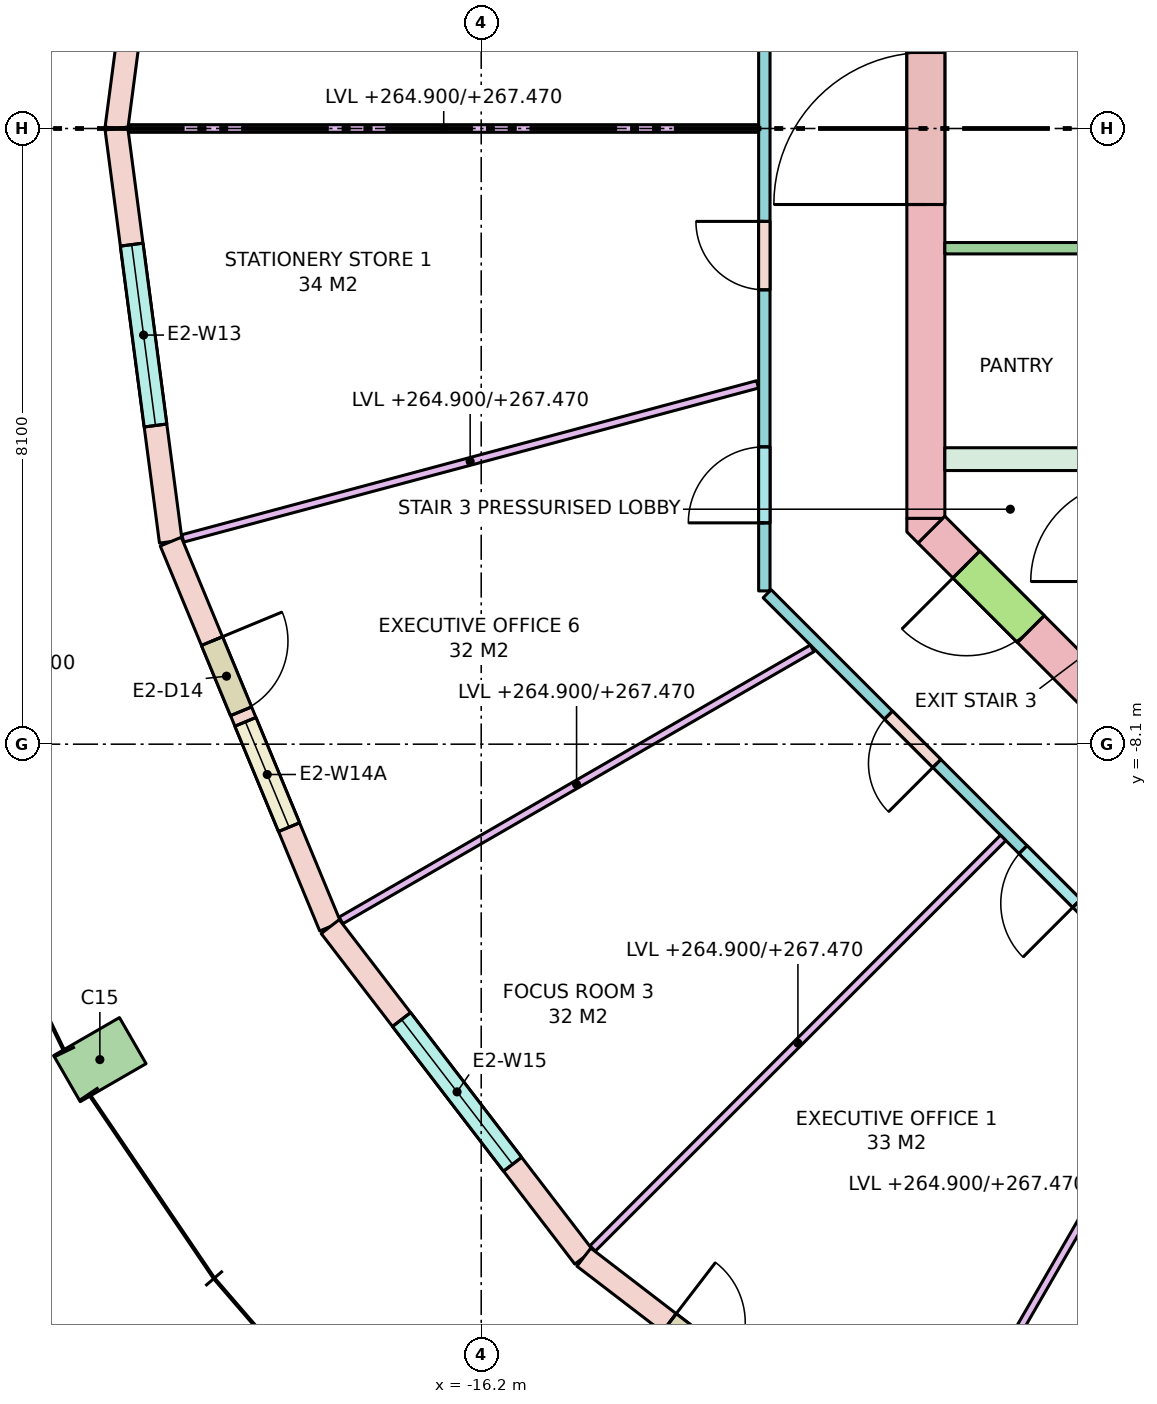
"""IFC4 building model, lengths in metres.
Left out: names, types, materials, properties, quantities, classifications, styles, units other than length and angle.
Written with IfcOpenShell. Run it as: python <this file> out.ifc"""

import sys

from ifc_helpers import new_model, si_unit, direction, frame, frame_2d, origin, origin_2d, place, context, subcontext, project, spatial, polyline, rectangle, outline, extrude, element, fill, save


model = new_model("IFC4")
c1 = context("Model", 3, precision=1e-05, world=origin(), true_north=direction((0.0, 1.0)))
c2 = subcontext(c1, "Body", "Model", "MODEL_VIEW")
j1 = project(units=[si_unit("LENGTHUNIT", "METRE"), si_unit("PLANEANGLEUNIT", "RADIAN")], contexts=[c1])
p1 = place(None, origin())
s1 = spatial("IfcSite", under=j1, at=p1, CompositionType="ELEMENT")
p2 = place(p1, origin())
s2 = spatial("IfcBuilding", under=s1, at=p2, CompositionType="ELEMENT")
p3 = place(p2, frame((0.0, 0.0, 264.9)))
s3 = spatial("IfcBuildingStorey", under=s2, at=p3, CompositionType="ELEMENT", Elevation=264.9)
p4 = place(p3, frame((-21.218, -12.25, 0.0), z_axis=(0.0, 0.0, 1.0), x_axis=(0.5, -0.866025403784, 0.0)))
e1 = element("IfcColumn", 1, at=p4, inside=s3, PredefinedType="COLUMN", context=c2, shape_type="SweptSolid", body=[
    extrude(rectangle(XDim=0.7, YDim=1.0, at=origin_2d()), origin(), (0.0, 0.0, 1.0), 3.7),
])
p5 = place(p3, frame((-10.35, -5.13, -0.28), z_axis=(0.0, 0.0, 1.0), x_axis=(0.0, 1.0, 0.0)))
e2 = element("IfcWall", 2, at=p5, inside=s3, PredefinedType="SHEAR", context=c2, shape_type="SweptSolid", body=[
    extrude(rectangle(XDim=10.26, YDim=0.5, at=frame_2d((5.13, 0.0))), origin(), (0.0, 0.0, 1.0), 3.7),
])
p6 = place(p5, frame((4.13, 0.0, 0.28)))
e3 = element("IfcOpeningElement", 3, at=p6, cuts=e2, PredefinedType="OPENING", context=c2, shape_type="SweptSolid", body=[
    extrude(rectangle(XDim=2.0, YDim=2.1, at=frame_2d((1.0, 1.05))), frame((0.0, 0.26, 0.0), z_axis=(0.0, -1.0, 0.0), x_axis=(1.0, 0.0, 0.0)), (0.0, 0.0, 1.0), 0.52),
])
p7 = place(p3, frame((-7.277, -8.277, -0.28), z_axis=(0.0, 0.0, 1.0), x_axis=(-0.707106781187, 0.707106781187, 0.0)))
e4 = element("IfcWall", 4, at=p7, inside=s3, PredefinedType="SHEAR", context=c2, shape_type="SweptSolid", body=[
    extrude(rectangle(XDim=4.243, YDim=0.5, at=frame_2d((2.121, 0.0))), origin(), (0.0, 0.0, 1.0), 3.7),
])
p8 = place(p7, frame((2.393, 0.0, 0.28)))
e5 = element("IfcOpeningElement", 5, at=p8, cuts=e4, PredefinedType="OPENING", context=c2, shape_type="SweptSolid", body=[
    extrude(rectangle(XDim=1.2, YDim=2.1, at=frame_2d((0.6, 1.05))), frame((0.0, 0.26, 0.0), z_axis=(0.0, -1.0, 0.0), x_axis=(1.0, 0.0, 0.0)), (0.0, 0.0, 1.0), 0.52),
])
p9 = place(p3, frame((0.0, 0.0, -0.28)))
e6 = element("IfcWall", 6, at=p9, inside=s3, PredefinedType="SHEAR", context=c2, shape_type="SweptSolid", body=[
    extrude(outline(polyline([(-10.6, -5.307), (-10.6, -5.13), (-10.13, -5.13), (-10.454, -5.454), (-10.6, -5.307)])), origin(), (0.0, 0.0, 1.0), 3.7),
])
p10 = place(p3, frame((-10.1, -4.35, 0.0), z_axis=(0.0, 0.0, 1.0), x_axis=(1.0, 0.0, 0.0)))
e7 = element("IfcWall", 7, at=p10, inside=s3, PredefinedType="SOLIDWALL", context=c2, shape_type="SweptSolid", body=[
    extrude(rectangle(XDim=8.1, YDim=0.3, at=frame_2d((4.05, 0.0))), origin(), (0.0, 0.0, 1.0), 3.42),
])
p11 = place(p3, frame((-20.284, 5.435, 0.0), z_axis=(0.0, 0.0, 1.0), x_axis=(-0.130527087244, -0.991444743541, 0.0)))
e8 = element("IfcWall", 8, at=p11, inside=s3, PredefinedType="STANDARD", context=c2, shape_type="SweptSolid", body=[
    extrude(rectangle(XDim=5.482, YDim=0.3, at=frame_2d((2.741, 0.0))), origin(), (0.0, 0.0, 1.0), 3.42),
])
p12 = place(p11, frame((1.416, 0.0, 0.0)))
e9 = element("IfcOpeningElement", 9, at=p12, cuts=e8, PredefinedType="OPENING", context=c2, shape_type="SweptSolid", body=[
    extrude(rectangle(XDim=1.0, YDim=2.4, at=frame_2d((0.5, 1.2))), frame((0.0, 0.16, 0.0), z_axis=(0.0, -1.0, 0.0), x_axis=(1.0, 0.0, 0.0)), (0.0, 0.0, 1.0), 0.32),
])
p13 = place(p11, frame((2.566, 0.0, 0.8)))
e10 = element("IfcOpeningElement", 10, at=p13, cuts=e8, PredefinedType="OPENING", context=c2, shape_type="SweptSolid", body=[
    extrude(rectangle(XDim=1.5, YDim=2.4, at=frame_2d((0.75, 1.2))), frame((0.0, 0.16, 0.0), z_axis=(0.0, -1.0, 0.0), x_axis=(1.0, 0.0, 0.0)), (0.0, 0.0, 1.0), 0.32),
])
p14 = place(p3, frame((-21.0, 0.0, 0.0), z_axis=(0.0, 0.0, 1.0), x_axis=(0.130527087244, -0.991444743541, 0.0)))
e11 = element("IfcWall", 11, at=p14, inside=s3, PredefinedType="STANDARD", context=c2, shape_type="SweptSolid", body=[
    extrude(rectangle(XDim=5.482, YDim=0.3, at=frame_2d((2.741, 0.0))), origin(), (0.0, 0.0, 1.0), 3.42),
])
p15 = place(p14, frame((1.541, 0.0, 0.8)))
e12 = element("IfcOpeningElement", 12, at=p15, cuts=e11, PredefinedType="OPENING", context=c2, shape_type="SweptSolid", body=[
    extrude(rectangle(XDim=2.4, YDim=2.4, at=frame_2d((1.2, 1.2))), frame((0.0, 0.16, 0.0), z_axis=(0.0, -1.0, 0.0), x_axis=(1.0, 0.0, 0.0)), (0.0, 0.0, 1.0), 0.32),
])
p16 = place(p3, frame((-20.284, -5.435, 0.0), z_axis=(0.0, 0.0, 1.0), x_axis=(0.382688740813, -0.923877333662, 0.0)))
e13 = element("IfcWall", 13, at=p16, inside=s3, PredefinedType="STANDARD", context=c2, shape_type="SweptSolid", body=[
    extrude(rectangle(XDim=5.482, YDim=0.3, at=frame_2d((2.741, 0.0))), origin(), (0.0, 0.0, 1.0), 3.42),
])
p17 = place(p16, frame((1.416, 0.0, 0.0)))
e14 = element("IfcOpeningElement", 14, at=p17, cuts=e13, PredefinedType="OPENING", context=c2, shape_type="SweptSolid", body=[
    extrude(rectangle(XDim=1.0, YDim=2.4, at=frame_2d((0.5, 1.2))), frame((0.0, 0.16, 0.0), z_axis=(0.0, -1.0, 0.0), x_axis=(1.0, 0.0, 0.0)), (0.0, 0.0, 1.0), 0.32),
])
p18 = place(p16, frame((2.566, 0.0, 0.8)))
e15 = element("IfcOpeningElement", 15, at=p18, cuts=e13, PredefinedType="OPENING", context=c2, shape_type="SweptSolid", body=[
    extrude(rectangle(XDim=1.5, YDim=2.4, at=frame_2d((0.75, 1.2))), frame((0.0, 0.16, 0.0), z_axis=(0.0, -1.0, 0.0), x_axis=(1.0, 0.0, 0.0)), (0.0, 0.0, 1.0), 0.32),
])
p19 = place(p3, frame((-18.187, -10.5, 0.0), z_axis=(0.0, 0.0, 1.0), x_axis=(0.608784891166, -0.793335336593, 0.0)))
e16 = element("IfcWall", 16, at=p19, inside=s3, PredefinedType="STANDARD", context=c2, shape_type="SweptSolid", body=[
    extrude(rectangle(XDim=5.482, YDim=0.3, at=frame_2d((2.741, 0.0))), origin(), (0.0, 0.0, 1.0), 3.42),
])
p20 = place(p19, frame((1.541, 0.0, 0.8)))
e17 = element("IfcOpeningElement", 17, at=p20, cuts=e16, PredefinedType="OPENING", context=c2, shape_type="SweptSolid", body=[
    extrude(rectangle(XDim=2.4, YDim=2.4, at=frame_2d((1.2, 1.2))), frame((0.0, 0.16, 0.0), z_axis=(0.0, -1.0, 0.0), x_axis=(1.0, 0.0, 0.0)), (0.0, 0.0, 1.0), 0.32),
])
p21 = place(p3, frame((-14.849, -14.849, 0.0), z_axis=(0.0, 0.0, 1.0), x_axis=(0.793335336593, -0.608784891166, 0.0)))
e18 = element("IfcWall", 18, at=p21, inside=s3, PredefinedType="STANDARD", context=c2, shape_type="SweptSolid", body=[
    extrude(rectangle(XDim=5.482, YDim=0.3, at=frame_2d((2.741, 0.0))), origin(), (0.0, 0.0, 1.0), 3.42),
])
p22 = place(p21, frame((1.416, 0.0, 0.0)))
e19 = element("IfcOpeningElement", 19, at=p22, cuts=e18, PredefinedType="OPENING", context=c2, shape_type="SweptSolid", body=[
    extrude(rectangle(XDim=1.0, YDim=2.4, at=frame_2d((0.5, 1.2))), frame((0.0, 0.16, 0.0), z_axis=(0.0, -1.0, 0.0), x_axis=(1.0, 0.0, 0.0)), (0.0, 0.0, 1.0), 0.32),
])
p23 = place(p21, frame((2.566, 0.0, 0.8)))
e20 = element("IfcOpeningElement", 20, at=p23, cuts=e18, PredefinedType="OPENING", context=c2, shape_type="SweptSolid", body=[
    extrude(rectangle(XDim=1.5, YDim=2.4, at=frame_2d((0.75, 1.2))), frame((0.0, 0.16, 0.0), z_axis=(0.0, -1.0, 0.0), x_axis=(1.0, 0.0, 0.0)), (0.0, 0.0, 1.0), 0.32),
])
p24 = place(p3, frame((-10.1, -1.575, 0.0), z_axis=(0.0, 0.0, 1.0), x_axis=(1.0, 0.0, 0.0)))
e21 = element("IfcWall", 21, at=p24, inside=s3, PredefinedType="PARTITIONING", context=c2, shape_type="SweptSolid", body=[
    extrude(rectangle(XDim=8.1, YDim=0.15, at=frame_2d((4.05, 0.0))), origin(), (0.0, 0.0, 1.0), 3.42),
])
p25 = place(p24, frame((2.333, 0.0, 0.0)))
e22 = element("IfcOpeningElement", 22, at=p25, cuts=e21, PredefinedType="OPENING", context=c2, shape_type="SweptSolid", body=[
    extrude(rectangle(XDim=0.9, YDim=2.1, at=frame_2d((0.45, 1.05))), frame((0.0, 0.085, 0.0), z_axis=(0.0, -1.0, 0.0), x_axis=(1.0, 0.0, 0.0)), (0.0, 0.0, 1.0), 0.17),
])
p26 = place(p24, frame((6.35, 0.0, 0.0)))
e23 = element("IfcOpeningElement", 23, at=p26, cuts=e21, PredefinedType="OPENING", context=c2, shape_type="SweptSolid", body=[
    extrude(rectangle(XDim=0.9, YDim=2.1, at=frame_2d((0.45, 1.05))), frame((0.0, 0.085, 0.0), z_axis=(0.0, -1.0, 0.0), x_axis=(1.0, 0.0, 0.0)), (0.0, 0.0, 1.0), 0.17),
])
p27 = place(p3, frame((-8.121, -10.438, 0.0), z_axis=(0.0, 0.0, 1.0), x_axis=(-0.707106781187, 0.707106781187, 0.0)))
e24 = element("IfcWall", 24, at=p27, inside=s3, PredefinedType="PARTITIONING", context=c2, shape_type="SweptSolid", body=[
    extrude(rectangle(XDim=6.105, YDim=0.15, at=frame_2d((3.053, 0.0))), origin(), (0.0, 0.0, 1.0), 2.57),
])
p28 = place(p27, frame((0.344, 0.0, 0.0)))
e25 = element("IfcOpeningElement", 25, at=p28, cuts=e24, PredefinedType="OPENING", context=c2, shape_type="SweptSolid", body=[
    extrude(rectangle(XDim=1.0, YDim=2.1, at=frame_2d((0.5, 1.05))), frame((0.0, 0.085, 0.0), z_axis=(0.0, -1.0, 0.0), x_axis=(1.0, 0.0, 0.0)), (0.0, 0.0, 1.0), 0.17),
])
p29 = place(p27, frame((2.948, 0.0, 0.0)))
e26 = element("IfcOpeningElement", 26, at=p29, cuts=e24, PredefinedType="OPENING", context=c2, shape_type="SweptSolid", body=[
    extrude(rectangle(XDim=0.9, YDim=2.1, at=frame_2d((0.45, 1.05))), frame((0.0, 0.085, 0.0), z_axis=(0.0, -1.0, 0.0), x_axis=(1.0, 0.0, 0.0)), (0.0, 0.0, 1.0), 0.17),
])
p30 = place(p3, frame((-12.475, -6.084, 0.0), z_axis=(0.0, 0.0, 1.0), x_axis=(0.0, 1.0, 0.0)))
e27 = element("IfcWall", 27, at=p30, inside=s3, PredefinedType="PARTITIONING", context=c2, shape_type="SweptSolid", body=[
    extrude(rectangle(XDim=12.167, YDim=0.15, at=frame_2d((6.084, 0.0))), origin(), (0.0, 0.0, 1.0), 2.57),
])
p31 = place(p30, frame((10.272, 0.0, 0.0)))
e28 = element("IfcOpeningElement", 28, at=p31, cuts=e27, PredefinedType="OPENING", context=c2, shape_type="SweptSolid", body=[
    extrude(rectangle(XDim=1.0, YDim=2.1, at=frame_2d((0.5, 1.05))), frame((0.0, 0.085, 0.0), z_axis=(0.0, -1.0, 0.0), x_axis=(1.0, 0.0, 0.0)), (0.0, 0.0, 1.0), 0.17),
])
p32 = place(p30, frame((7.306, 0.0, 0.0)))
e29 = element("IfcOpeningElement", 29, at=p32, cuts=e27, PredefinedType="OPENING", context=c2, shape_type="SweptSolid", body=[
    extrude(rectangle(XDim=0.9, YDim=2.1, at=frame_2d((0.45, 1.05))), frame((0.0, 0.085, 0.0), z_axis=(0.0, -1.0, 0.0), x_axis=(1.0, 0.0, 0.0)), (0.0, 0.0, 1.0), 0.17),
])
p33 = place(p30, frame((3.961, 0.0, 0.0)))
e30 = element("IfcOpeningElement", 30, at=p33, cuts=e27, PredefinedType="OPENING", context=c2, shape_type="SweptSolid", body=[
    extrude(rectangle(XDim=0.9, YDim=2.1, at=frame_2d((0.45, 1.05))), frame((0.0, 0.085, 0.0), z_axis=(0.0, -1.0, 0.0), x_axis=(1.0, 0.0, 0.0)), (0.0, 0.0, 1.0), 0.17),
])
p34 = place(p30, frame((0.896, 0.0, 0.0)))
e31 = element("IfcOpeningElement", 31, at=p34, cuts=e27, PredefinedType="OPENING", context=c2, shape_type="SweptSolid", body=[
    extrude(rectangle(XDim=1.0, YDim=2.1, at=frame_2d((0.5, 1.05))), frame((0.0, 0.085, 0.0), z_axis=(0.0, -1.0, 0.0), x_axis=(1.0, 0.0, 0.0)), (0.0, 0.0, 1.0), 0.17),
])
p35 = place(p3, frame((-12.55, 0.0, 0.0), z_axis=(0.0, 0.0, 1.0), x_axis=(-1.0, 0.0, 0.0)))
e32 = element("IfcWall", 32, at=p35, inside=s3, PredefinedType="PARTITIONING", context=c2, shape_type="SweptSolid", body=[
    extrude(rectangle(XDim=8.287, YDim=0.1, at=frame_2d((4.143, 0.0))), origin(), (0.0, 0.0, 1.0), 2.57),
])
p36 = place(p3, frame((-12.564, -3.367, 0.0), z_axis=(0.0, 0.0, 1.0), x_axis=(-0.965933576344, -0.258790119773, 0.0)))
e33 = element("IfcWall", 33, at=p36, inside=s3, PredefinedType="PARTITIONING", context=c2, shape_type="SweptSolid", body=[
    extrude(rectangle(XDim=7.829, YDim=0.1, at=frame_2d((3.915, 0.0))), origin(), (0.0, 0.0, 1.0), 2.57),
])
p37 = place(p3, frame((-11.846, -6.839, 0.0), z_axis=(0.0, 0.0, 1.0), x_axis=(-0.866011787705, -0.500023583, 0.0)))
e34 = element("IfcWall", 34, at=p37, inside=s3, PredefinedType="PARTITIONING", context=c2, shape_type="SweptSolid", body=[
    extrude(rectangle(XDim=7.158, YDim=0.1, at=frame_2d((3.579, 0.0))), origin(), (0.0, 0.0, 1.0), 2.57),
])
p38 = place(p3, frame((-9.333, -9.333, 0.0), z_axis=(0.0, 0.0, 1.0), x_axis=(-0.707106781187, -0.707106781187, 0.0)))
e35 = element("IfcWall", 35, at=p38, inside=s3, PredefinedType="PARTITIONING", context=c2, shape_type="SweptSolid", body=[
    extrude(rectangle(XDim=7.639, YDim=0.1, at=frame_2d((3.819, 0.0))), origin(), (0.0, 0.0, 1.0), 2.57),
])
p39 = place(p3, frame((-6.105, -10.575, 0.0), z_axis=(0.0, 0.0, 1.0), x_axis=(-0.50001399067, -0.866017326117, 0.0)))
e36 = element("IfcWall", 36, at=p39, inside=s3, PredefinedType="PARTITIONING", context=c2, shape_type="SweptSolid", body=[
    extrude(rectangle(XDim=8.626, YDim=0.1, at=frame_2d((4.313, 0.0))), origin(), (0.0, 0.0, 1.0), 2.57),
])
p40 = place(p15, origin())
e37 = element("IfcWindow", 37, at=p40, inside=s3, PartitioningType="SINGLE_PANEL", PredefinedType="WINDOW", context=c2, shape_type="SweptSolid", body=[
    extrude(rectangle(XDim=2.4, YDim=2.4, at=frame_2d((1.2, 1.2))), frame((0.0, 0.03, 0.0), z_axis=(0.0, -1.0, 0.0), x_axis=(1.0, 0.0, 0.0)), (0.0, 0.0, 1.0), 0.06),
])
fill(e12, e37)
p41 = place(p17, origin())
e38 = element("IfcDoor", 38, at=p41, inside=s3, OperationType="SINGLE_SWING_LEFT", PredefinedType="DOOR", context=c2, shape_type="SweptSolid", body=[
    extrude(rectangle(XDim=1.0, YDim=2.4, at=frame_2d((0.5, 1.2))), frame((0.0, 0.025, 0.0), z_axis=(0.0, -1.0, 0.0), x_axis=(1.0, 0.0, 0.0)), (0.0, 0.0, 1.0), 0.05),
])
fill(e14, e38)
p42 = place(p18, origin())
e39 = element("IfcWindow", 39, at=p42, inside=s3, PartitioningType="SINGLE_PANEL", PredefinedType="WINDOW", context=c2, shape_type="SweptSolid", body=[
    extrude(rectangle(XDim=1.5, YDim=2.4, at=frame_2d((0.75, 1.2))), frame((0.0, 0.03, 0.0), z_axis=(0.0, -1.0, 0.0), x_axis=(1.0, 0.0, 0.0)), (0.0, 0.0, 1.0), 0.06),
])
fill(e15, e39)
p43 = place(p20, origin())
e40 = element("IfcWindow", 40, at=p43, inside=s3, PartitioningType="SINGLE_PANEL", PredefinedType="WINDOW", context=c2, shape_type="SweptSolid", body=[
    extrude(rectangle(XDim=2.4, YDim=2.4, at=frame_2d((1.2, 1.2))), frame((0.0, 0.03, 0.0), z_axis=(0.0, -1.0, 0.0), x_axis=(1.0, 0.0, 0.0)), (0.0, 0.0, 1.0), 0.06),
])
fill(e17, e40)
p44 = place(p22, origin())
e41 = element("IfcDoor", 41, at=p44, inside=s3, OperationType="SINGLE_SWING_LEFT", PredefinedType="DOOR", context=c2, shape_type="SweptSolid", body=[
    extrude(rectangle(XDim=1.0, YDim=2.4, at=frame_2d((0.5, 1.2))), frame((0.0, 0.025, 0.0), z_axis=(0.0, -1.0, 0.0), x_axis=(1.0, 0.0, 0.0)), (0.0, 0.0, 1.0), 0.05),
])
fill(e19, e41)
p45 = place(p8, origin())
e42 = element("IfcDoor", 42, at=p45, inside=s3, OperationType="SINGLE_SWING_RIGHT", PredefinedType="DOOR", context=c2, shape_type="SweptSolid", body=[
    extrude(rectangle(XDim=1.2, YDim=2.1, at=frame_2d((0.6, 1.05))), frame((0.0, 0.025, 0.0), z_axis=(0.0, -1.0, 0.0), x_axis=(1.0, 0.0, 0.0)), (0.0, 0.0, 1.0), 0.05),
])
fill(e5, e42)
p46 = place(p6, origin())
e43 = element("IfcDoor", 43, at=p46, inside=s3, OperationType="DOUBLE_DOOR_SINGLE_SWING", PredefinedType="DOOR", context=c2, shape_type="SweptSolid", body=[
    extrude(rectangle(XDim=2.0, YDim=2.1, at=frame_2d((1.0, 1.05))), frame((0.0, 0.025, 0.0), z_axis=(0.0, -1.0, 0.0), x_axis=(1.0, 0.0, 0.0)), (0.0, 0.0, 1.0), 0.05),
])
fill(e3, e43)
p47 = place(p28, origin())
e44 = element("IfcDoor", 44, at=p47, inside=s3, OperationType="SINGLE_SWING_LEFT", PredefinedType="DOOR", context=c2, shape_type="SweptSolid", body=[
    extrude(rectangle(XDim=1.0, YDim=2.1, at=frame_2d((0.5, 1.05))), frame((0.0, 0.025, 0.0), z_axis=(0.0, -1.0, 0.0), x_axis=(1.0, 0.0, 0.0)), (0.0, 0.0, 1.0), 0.05),
])
fill(e25, e44)
p48 = place(p33, origin())
e45 = element("IfcDoor", 45, at=p48, inside=s3, OperationType="SINGLE_SWING_RIGHT", PredefinedType="DOOR", context=c2, shape_type="SweptSolid", body=[
    extrude(rectangle(XDim=0.9, YDim=2.1, at=frame_2d((0.45, 1.05))), frame((0.0, 0.025, 0.0), z_axis=(0.0, -1.0, 0.0), x_axis=(1.0, 0.0, 0.0)), (0.0, 0.0, 1.0), 0.05),
])
fill(e30, e45)
p49 = place(p34, origin())
e46 = element("IfcDoor", 46, at=p49, inside=s3, OperationType="SINGLE_SWING_LEFT", PredefinedType="DOOR", context=c2, shape_type="SweptSolid", body=[
    extrude(rectangle(XDim=1.0, YDim=2.1, at=frame_2d((0.5, 1.05))), frame((0.0, 0.025, 0.0), z_axis=(0.0, -1.0, 0.0), x_axis=(1.0, 0.0, 0.0)), (0.0, 0.0, 1.0), 0.05),
])
fill(e31, e46)
p50 = place(p29, origin())
e47 = element("IfcDoor", 47, at=p50, inside=s3, OperationType="SINGLE_SWING_LEFT", PredefinedType="DOOR", context=c2, shape_type="SweptSolid", body=[
    extrude(rectangle(XDim=0.9, YDim=2.1, at=frame_2d((0.45, 1.05))), frame((0.0, 0.025, 0.0), z_axis=(0.0, -1.0, 0.0), x_axis=(1.0, 0.0, 0.0)), (0.0, 0.0, 1.0), 0.05),
])
fill(e26, e47)
save(model, sys.argv[1])
